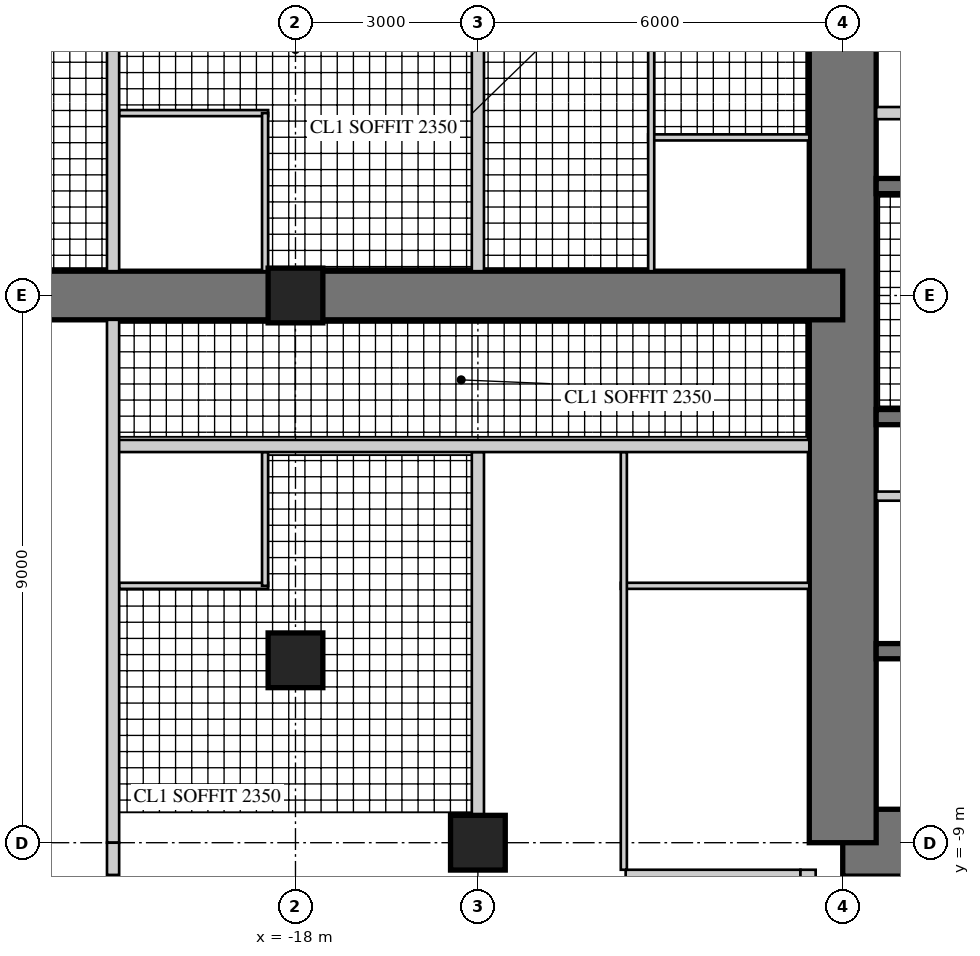
"""IFC4 building model, lengths in metres.
Left out: names, types, materials, properties, quantities, classifications, styles, units other than length and angle.
Written with IfcOpenShell. Run it as: python <this file> out.ifc"""

import sys

from ifc_helpers import new_model, si_unit, direction, frame, frame_2d, origin, origin_2d, place, context, subcontext, project, spatial, rectangle, hollow_rectangle, extrude, element, fill, save


model = new_model("IFC4")
c1 = context("Model", 3, precision=1e-05, world=origin(), true_north=direction((0.0, 1.0)))
c2 = subcontext(c1, "Body", "Model", "MODEL_VIEW")
j1 = project(units=[si_unit("LENGTHUNIT", "METRE"), si_unit("PLANEANGLEUNIT", "RADIAN")], contexts=[c1])
p1 = place(None, origin())
s1 = spatial("IfcSite", under=j1, at=p1, CompositionType="ELEMENT")
p2 = place(p1, origin())
s2 = spatial("IfcBuilding", under=s1, at=p2, CompositionType="ELEMENT")
p3 = place(p2, frame((0.0, 0.0, 179.7)))
s3 = spatial("IfcBuildingStorey", under=s2, at=p3, CompositionType="ELEMENT", Elevation=179.7)
p4 = place(p3, frame((-9.0, -9.0, 0.0), z_axis=(0.0, 0.0, 1.0), x_axis=(1.0, 0.0, 0.0)))
e1 = element("IfcWall", 1, at=p4, inside=s3, PredefinedType="SHEAR", context=c2, shape_type="SweptSolid", body=[
    extrude(rectangle(XDim=18.0, YDim=1.1, at=frame_2d((9.0, 0.0))), origin(), (0.0, 0.0, 1.0), 3.4),
])
p5 = place(p4, frame((9.8, 0.0, 0.0)))
e2 = element("IfcOpeningElement", 2, at=p5, cuts=e1, PredefinedType="OPENING", context=c2, shape_type="SweptSolid", body=[
    extrude(rectangle(XDim=1.0, YDim=2.4, at=frame_2d((0.5, 1.2))), frame((0.0, 0.56, 0.0), z_axis=(0.0, -1.0, 0.0), x_axis=(1.0, 0.0, 0.0)), (0.0, 0.0, 1.0), 1.12),
])
p6 = place(p3, frame((-9.0, 9.0, 0.0), z_axis=(0.0, 0.0, 1.0), x_axis=(0.0, -1.0, 0.0)))
e3 = element("IfcWall", 3, at=p6, inside=s3, PredefinedType="SHEAR", context=c2, shape_type="SweptSolid", body=[
    extrude(rectangle(XDim=18.0, YDim=1.1, at=frame_2d((9.0, 0.0))), origin(), (0.0, 0.0, 1.0), 3.4),
])
p7 = place(p6, frame((9.8, 0.0, 0.0)))
e4 = element("IfcOpeningElement", 4, at=p7, cuts=e3, PredefinedType="OPENING", context=c2, shape_type="SweptSolid", body=[
    extrude(rectangle(XDim=1.0, YDim=2.4, at=frame_2d((0.5, 1.2))), frame((0.0, 0.56, 0.0), z_axis=(0.0, -1.0, 0.0), x_axis=(1.0, 0.0, 0.0)), (0.0, 0.0, 1.0), 1.12),
])
p8 = place(p3, frame((-2.125, 1.8, 0.0), z_axis=(0.0, 0.0, 1.0), x_axis=(-1.0, 0.0, 0.0)))
e5 = element("IfcWall", 5, at=p8, inside=s3, PredefinedType="SHEAR", context=c2, shape_type="SweptSolid", body=[
    extrude(rectangle(XDim=6.325, YDim=0.25, at=frame_2d((3.163, 0.0))), origin(), (0.0, 0.0, 1.0), 3.4),
])
p9 = place(p3, frame((-5.725, 3.0, 0.0), z_axis=(0.0, 0.0, 1.0), x_axis=(-1.0, 0.0, 0.0)))
e6 = element("IfcWall", 6, at=p9, inside=s3, PredefinedType="PARTITIONING", context=c2, shape_type="SweptSolid", body=[
    extrude(rectangle(XDim=2.725, YDim=0.2, at=frame_2d((1.362, 0.0))), origin(), (0.0, 0.0, 1.0), 3.4),
])
p10 = place(p3, frame((-1.925, -2.0, 0.0), z_axis=(0.0, 0.0, 1.0), x_axis=(-1.0, 0.0, 0.0)))
e7 = element("IfcWall", 7, at=p10, inside=s3, PredefinedType="SHEAR", context=c2, shape_type="SweptSolid", body=[
    extrude(rectangle(XDim=6.525, YDim=0.25, at=frame_2d((3.262, 0.0))), origin(), (0.0, 0.0, 1.0), 3.4),
])
p11 = place(p3, frame((-1.925, -5.85, 0.0), z_axis=(0.0, 0.0, 1.0), x_axis=(-1.0, 0.0, 0.0)))
e8 = element("IfcWall", 8, at=p11, inside=s3, PredefinedType="SHEAR", context=c2, shape_type="SweptSolid", body=[
    extrude(rectangle(XDim=6.525, YDim=0.25, at=frame_2d((3.262, 0.0))), origin(), (0.0, 0.0, 1.0), 3.4),
])
p12 = place(p11, frame((0.471, 0.0, 0.0)))
e9 = element("IfcOpeningElement", 9, at=p12, cuts=e8, PredefinedType="OPENING", context=c2, shape_type="SweptSolid", body=[
    extrude(rectangle(XDim=1.1, YDim=2.2, at=frame_2d((0.55, 1.1))), frame((0.0, 0.135, 0.0), z_axis=(0.0, -1.0, 0.0), x_axis=(1.0, 0.0, 0.0)), (0.0, 0.0, 1.0), 0.27),
])
p13 = place(p11, frame((2.712, 0.0, 0.0)))
e10 = element("IfcOpeningElement", 10, at=p13, cuts=e8, PredefinedType="OPENING", context=c2, shape_type="SweptSolid", body=[
    extrude(rectangle(XDim=1.1, YDim=2.2, at=frame_2d((0.55, 1.1))), frame((0.0, 0.135, 0.0), z_axis=(0.0, -1.0, 0.0), x_axis=(1.0, 0.0, 0.0)), (0.0, 0.0, 1.0), 0.27),
])
p14 = place(p11, frame((4.954, 0.0, 0.0)))
e11 = element("IfcOpeningElement", 11, at=p14, cuts=e8, PredefinedType="OPENING", context=c2, shape_type="SweptSolid", body=[
    extrude(rectangle(XDim=1.1, YDim=2.2, at=frame_2d((0.55, 1.1))), frame((0.0, 0.135, 0.0), z_axis=(0.0, -1.0, 0.0), x_axis=(1.0, 0.0, 0.0)), (0.0, 0.0, 1.0), 0.27),
])
p15 = place(p3, frame((-1.925, -3.3, 0.0), z_axis=(0.0, 0.0, 1.0), x_axis=(-1.0, 0.0, 0.0)))
e12 = element("IfcWall", 12, at=p15, inside=s3, PredefinedType="PARTITIONING", context=c2, shape_type="SweptSolid", body=[
    extrude(rectangle(XDim=6.525, YDim=0.15, at=frame_2d((3.262, 0.0))), origin(), (0.0, 0.0, 1.0), 3.4),
])
p16 = place(p15, frame((0.075, 0.0, 0.0)))
e13 = element("IfcOpeningElement", 13, at=p16, cuts=e12, PredefinedType="OPENING", context=c2, shape_type="SweptSolid", body=[
    extrude(rectangle(XDim=0.8, YDim=2.1, at=frame_2d((0.4, 1.05))), frame((0.0, 0.085, 0.0), z_axis=(0.0, -1.0, 0.0), x_axis=(1.0, 0.0, 0.0)), (0.0, 0.0, 1.0), 0.17),
])
p17 = place(p15, frame((3.675, 0.0, 0.0)))
e14 = element("IfcOpeningElement", 14, at=p17, cuts=e12, PredefinedType="OPENING", context=c2, shape_type="SweptSolid", body=[
    extrude(rectangle(XDim=0.8, YDim=2.1, at=frame_2d((0.4, 1.05))), frame((0.0, 0.085, 0.0), z_axis=(0.0, -1.0, 0.0), x_axis=(1.0, 0.0, 0.0)), (0.0, 0.0, 1.0), 0.17),
])
p18 = place(p3, frame((-9.0, 0.0, 0.0), z_axis=(0.0, 0.0, 1.0), x_axis=(-1.0, 0.0, 0.0)))
e15 = element("IfcWall", 15, at=p18, inside=s3, PredefinedType="SHEAR", context=c2, shape_type="SweptSolid", body=[
    extrude(rectangle(XDim=18.0, YDim=0.8, at=frame_2d((9.0, 0.0))), origin(), (0.0, 0.0, 1.0), 3.4),
])
p19 = place(p18, frame((3.95, 0.0, 0.0)))
e16 = element("IfcOpeningElement", 16, at=p19, cuts=e15, PredefinedType="OPENING", context=c2, shape_type="SweptSolid", body=[
    extrude(rectangle(XDim=1.0, YDim=2.15, at=frame_2d((0.5, 1.075))), frame((0.0, 0.41, 0.0), z_axis=(0.0, -1.0, 0.0), x_axis=(1.0, 0.0, 0.0)), (0.0, 0.0, 1.0), 0.82),
])
p20 = place(p18, frame((6.6, 0.0, 0.0)))
e17 = element("IfcOpeningElement", 17, at=p20, cuts=e15, PredefinedType="OPENING", context=c2, shape_type="SweptSolid", body=[
    extrude(rectangle(XDim=1.0, YDim=2.15, at=frame_2d((0.5, 1.075))), frame((0.0, 0.41, 0.0), z_axis=(0.0, -1.0, 0.0), x_axis=(1.0, 0.0, 0.0)), (0.0, 0.0, 1.0), 0.82),
])
p21 = place(p18, frame((13.25, 0.0, 0.0)))
e18 = element("IfcOpeningElement", 18, at=p21, cuts=e15, PredefinedType="OPENING", context=c2, shape_type="SweptSolid", body=[
    extrude(rectangle(XDim=1.0, YDim=2.2, at=frame_2d((0.5, 1.1))), frame((0.0, 0.41, 0.0), z_axis=(0.0, -1.0, 0.0), x_axis=(1.0, 0.0, 0.0)), (0.0, 0.0, 1.0), 0.82),
])
for number, where, z_axis, x_axis in (
    (19, (-15.0, -9.0, 0.0), (0.0, 0.0, 1.0), (1.0, 0.0, 0.0)),
    (20, (-18.0, 0.0, 0.0), (0.0, 0.0, 1.0), (1.0, 0.0, 0.0)),
    (21, (-18.0, -6.0, 0.0), (0.0, 0.0, 1.0), (1.0, 0.0, 0.0)),
):
    element("IfcColumn", number, at=place(p3, frame(where, z_axis=z_axis, x_axis=x_axis)), inside=s3, PredefinedType="COLUMN", context=c2, shape_type="SweptSolid", body=[
        extrude(rectangle(XDim=0.9, YDim=0.9, at=origin_2d()), origin(), (0.0, 0.0, 1.0), 3.4),
    ])
p22 = place(p3, frame((-12.57, -9.57, 0.0), z_axis=(0.0, 0.0, 1.0), x_axis=(1.0, 0.0, 0.0)))
e22 = element("IfcWall", 22, at=p22, inside=s3, PredefinedType="SOLIDWALL", context=c2, shape_type="SweptSolid", body=[
    extrude(rectangle(XDim=2.875, YDim=0.25, at=frame_2d((1.438, 0.0))), origin(), (0.0, 0.0, 1.0), 3.22),
])
p23 = place(p22, frame((0.6, 0.0, 0.0)))
e23 = element("IfcOpeningElement", 23, at=p23, cuts=e22, PredefinedType="OPENING", context=c2, shape_type="SweptSolid", body=[
    extrude(rectangle(XDim=1.0, YDim=2.2, at=frame_2d((0.5, 1.1))), frame((0.0, 0.135, 0.0), z_axis=(0.0, -1.0, 0.0), x_axis=(1.0, 0.0, 0.0)), (0.0, 0.0, 1.0), 0.27),
])
p24 = place(p3, frame((-9.57, -9.445, 0.0), z_axis=(0.0, 0.0, 1.0), x_axis=(0.0, -1.0, 0.0)))
e24 = element("IfcWall", 24, at=p24, inside=s3, PredefinedType="SOLIDWALL", context=c2, shape_type="SweptSolid", body=[
    extrude(rectangle(XDim=3.125, YDim=0.25, at=frame_2d((1.562, 0.0))), origin(), (0.0, 0.0, 1.0), 3.22),
])
p25 = place(p24, frame((0.6, 0.0, 0.0)))
e25 = element("IfcOpeningElement", 25, at=p25, cuts=e24, PredefinedType="OPENING", context=c2, shape_type="SweptSolid", body=[
    extrude(rectangle(XDim=1.0, YDim=2.2, at=frame_2d((0.5, 1.1))), frame((0.0, 0.135, 0.0), z_axis=(0.0, -1.0, 0.0), x_axis=(1.0, 0.0, 0.0)), (0.0, 0.0, 1.0), 0.27),
])
p26 = place(p3, frame((-9.55, -4.775, 0.0), z_axis=(0.0, 0.0, 1.0), x_axis=(-1.0, 0.0, 0.0)))
e26 = element("IfcWall", 26, at=p26, inside=s3, PredefinedType="PARTITIONING", context=c2, shape_type="SweptSolid", body=[
    extrude(rectangle(XDim=3.1, YDim=0.1, at=frame_2d((1.55, 0.0))), origin(), (0.0, 0.0, 1.0), 3.22),
])
p27 = place(p3, frame((-12.6, -2.575, 0.0), z_axis=(0.0, 0.0, 1.0), x_axis=(0.0, -1.0, 0.0)))
e27 = element("IfcWall", 27, at=p27, inside=s3, PredefinedType="PARTITIONING", context=c2, shape_type="SweptSolid", body=[
    extrude(rectangle(XDim=6.87, YDim=0.1, at=frame_2d((3.435, 0.0))), origin(), (0.0, 0.0, 1.0), 3.22),
])
p28 = place(p27, frame((0.55, 0.0, 0.0)))
e28 = element("IfcOpeningElement", 28, at=p28, cuts=e27, PredefinedType="OPENING", context=c2, shape_type="SweptSolid", body=[
    extrude(rectangle(XDim=0.9, YDim=2.1, at=frame_2d((0.45, 1.05))), frame((0.0, 0.06, 0.0), z_axis=(0.0, -1.0, 0.0), x_axis=(1.0, 0.0, 0.0)), (0.0, 0.0, 1.0), 0.12),
])
p29 = place(p27, frame((2.65, 0.0, 0.0)))
e29 = element("IfcOpeningElement", 29, at=p29, cuts=e27, PredefinedType="OPENING", context=c2, shape_type="SweptSolid", body=[
    extrude(rectangle(XDim=0.9, YDim=2.1, at=frame_2d((0.45, 1.05))), frame((0.0, 0.06, 0.0), z_axis=(0.0, -1.0, 0.0), x_axis=(1.0, 0.0, 0.0)), (0.0, 0.0, 1.0), 0.12),
])
p30 = place(p3, frame((-9.55, 2.6, 0.0), z_axis=(0.0, 0.0, 1.0), x_axis=(-1.0, 0.0, 0.0)))
e30 = element("IfcWall", 30, at=p30, inside=s3, PredefinedType="PARTITIONING", context=c2, shape_type="SweptSolid", body=[
    extrude(rectangle(XDim=2.65, YDim=0.1, at=frame_2d((1.325, 0.0))), origin(), (0.0, 0.0, 1.0), 3.22),
])
p31 = place(p3, frame((-12.15, 9.445, 0.0), z_axis=(0.0, 0.0, 1.0), x_axis=(0.0, -1.0, 0.0)))
e31 = element("IfcWall", 31, at=p31, inside=s3, PredefinedType="PARTITIONING", context=c2, shape_type="SweptSolid", body=[
    extrude(rectangle(XDim=9.045, YDim=0.1, at=frame_2d((4.522, 0.0))), origin(), (0.0, 0.0, 1.0), 3.22),
])
p32 = place(p31, frame((5.495, 0.0, 0.0)))
e32 = element("IfcOpeningElement", 32, at=p32, cuts=e31, PredefinedType="OPENING", context=c2, shape_type="SweptSolid", body=[
    extrude(rectangle(XDim=0.9, YDim=2.1, at=frame_2d((0.45, 1.05))), frame((0.0, 0.06, 0.0), z_axis=(0.0, -1.0, 0.0), x_axis=(1.0, 0.0, 0.0)), (0.0, 0.0, 1.0), 0.12),
])
p33 = place(p31, frame((7.595, 0.0, 0.0)))
e33 = element("IfcOpeningElement", 33, at=p33, cuts=e31, PredefinedType="OPENING", context=c2, shape_type="SweptSolid", body=[
    extrude(rectangle(XDim=0.9, YDim=2.1, at=frame_2d((0.45, 1.05))), frame((0.0, 0.06, 0.0), z_axis=(0.0, -1.0, 0.0), x_axis=(1.0, 0.0, 0.0)), (0.0, 0.0, 1.0), 0.12),
])
p34 = place(p3, frame((-15.0, -2.575, 0.0), z_axis=(0.0, 0.0, 1.0), x_axis=(0.0, -1.0, 0.0)))
e34 = element("IfcWall", 34, at=p34, inside=s3, PredefinedType="SOLIDWALL", context=c2, shape_type="SweptSolid", body=[
    extrude(rectangle(XDim=5.975, YDim=0.2, at=frame_2d((2.988, 0.0))), origin(), (0.0, 0.0, 1.0), 2.47),
])
p35 = place(p3, frame((-15.0, 8.55, 0.0), z_axis=(0.0, 0.0, 1.0), x_axis=(0.0, -1.0, 0.0)))
e35 = element("IfcWall", 35, at=p35, inside=s3, PredefinedType="SOLIDWALL", context=c2, shape_type="SweptSolid", body=[
    extrude(rectangle(XDim=8.15, YDim=0.2, at=frame_2d((4.075, 0.0))), origin(), (0.0, 0.0, 1.0), 2.47),
])
p36 = place(p3, frame((-18.45, -4.775, 0.0), z_axis=(0.0, 0.0, 1.0), x_axis=(-1.0, 0.0, 0.0)))
e36 = element("IfcWall", 36, at=p36, inside=s3, PredefinedType="PARTITIONING", context=c2, shape_type="SweptSolid", body=[
    extrude(rectangle(XDim=2.45, YDim=0.1, at=frame_2d((1.225, 0.0))), origin(), (0.0, 0.0, 1.0), 3.22),
])
p37 = place(p3, frame((-18.5, -2.575, 0.0), z_axis=(0.0, 0.0, 1.0), x_axis=(0.0, -1.0, 0.0)))
e37 = element("IfcWall", 37, at=p37, inside=s3, PredefinedType="PARTITIONING", context=c2, shape_type="SweptSolid", body=[
    extrude(rectangle(XDim=2.2, YDim=0.1, at=frame_2d((1.1, 0.0))), origin(), (0.0, 0.0, 1.0), 3.22),
])
p38 = place(p37, frame((0.55, 0.0, 0.0)))
e38 = element("IfcOpeningElement", 38, at=p38, cuts=e37, PredefinedType="OPENING", context=c2, shape_type="SweptSolid", body=[
    extrude(rectangle(XDim=0.9, YDim=2.1, at=frame_2d((0.45, 1.05))), frame((0.0, 0.06, 0.0), z_axis=(0.0, -1.0, 0.0), x_axis=(1.0, 0.0, 0.0)), (0.0, 0.0, 1.0), 0.12),
])
p39 = place(p3, frame((-18.45, 3.0, 0.0), z_axis=(0.0, 0.0, 1.0), x_axis=(-1.0, 0.0, 0.0)))
e39 = element("IfcWall", 39, at=p39, inside=s3, PredefinedType="PARTITIONING", context=c2, shape_type="SweptSolid", body=[
    extrude(rectangle(XDim=2.45, YDim=0.1, at=frame_2d((1.225, 0.0))), origin(), (0.0, 0.0, 1.0), 3.22),
])
p40 = place(p3, frame((-18.5, 3.0, 0.0), z_axis=(0.0, 0.0, 1.0), x_axis=(0.0, -1.0, 0.0)))
e40 = element("IfcWall", 40, at=p40, inside=s3, PredefinedType="PARTITIONING", context=c2, shape_type="SweptSolid", body=[
    extrude(rectangle(XDim=2.6, YDim=0.1, at=frame_2d((1.3, 0.0))), origin(), (0.0, 0.0, 1.0), 3.22),
])
p41 = place(p40, frame((0.55, 0.0, 0.0)))
e41 = element("IfcOpeningElement", 41, at=p41, cuts=e40, PredefinedType="OPENING", context=c2, shape_type="SweptSolid", body=[
    extrude(rectangle(XDim=0.9, YDim=2.1, at=frame_2d((0.45, 1.05))), frame((0.0, 0.06, 0.0), z_axis=(0.0, -1.0, 0.0), x_axis=(1.0, 0.0, 0.0)), (0.0, 0.0, 1.0), 0.12),
])
p42 = place(p3, frame((-9.55, -2.475, 0.0), z_axis=(0.0, 0.0, 1.0), x_axis=(-1.0, 0.0, 0.0)))
e42 = element("IfcWall", 42, at=p42, inside=s3, PredefinedType="SOLIDWALL", context=c2, shape_type="SweptSolid", body=[
    extrude(rectangle(XDim=11.45, YDim=0.2, at=frame_2d((5.725, 0.0))), origin(), (0.0, 0.0, 1.0), 3.22),
])
p43 = place(p42, frame((3.6, 0.0, 0.0)))
e43 = element("IfcOpeningElement", 43, at=p43, cuts=e42, PredefinedType="OPENING", context=c2, shape_type="SweptSolid", body=[
    extrude(rectangle(XDim=1.0, YDim=2.15, at=frame_2d((0.5, 1.075))), frame((0.0, 0.11, 0.0), z_axis=(0.0, -1.0, 0.0), x_axis=(1.0, 0.0, 0.0)), (0.0, 0.0, 1.0), 0.22),
])
p44 = place(p42, frame((6.05, 0.0, 0.0)))
e44 = element("IfcOpeningElement", 44, at=p44, cuts=e42, PredefinedType="OPENING", context=c2, shape_type="SweptSolid", body=[
    extrude(rectangle(XDim=1.0, YDim=2.15, at=frame_2d((0.5, 1.075))), frame((0.0, 0.11, 0.0), z_axis=(0.0, -1.0, 0.0), x_axis=(1.0, 0.0, 0.0)), (0.0, 0.0, 1.0), 0.22),
])
p45 = place(p3, frame((-21.0, 9.0, 0.0), z_axis=(0.0, 0.0, 1.0), x_axis=(0.0, -1.0, 0.0)))
e45 = element("IfcWall", 45, at=p45, inside=s3, PredefinedType="SOLIDWALL", context=c2, shape_type="SweptSolid", body=[
    extrude(rectangle(XDim=8.6, YDim=0.2, at=frame_2d((4.3, 0.0))), origin(), (0.0, 0.0, 1.0), 2.62),
])
p46 = place(p3, frame((-21.0, -0.4, 0.0), z_axis=(0.0, 0.0, 1.0), x_axis=(0.0, -1.0, 0.0)))
e46 = element("IfcWall", 46, at=p46, inside=s3, PredefinedType="SOLIDWALL", context=c2, shape_type="SweptSolid", body=[
    extrude(rectangle(XDim=8.6, YDim=0.2, at=frame_2d((4.3, 0.0))), origin(), (0.0, 0.0, 1.0), 2.62),
])
p47 = place(p46, frame((0.4, 0.0, 0.0)))
e47 = element("IfcOpeningElement", 47, at=p47, cuts=e46, PredefinedType="OPENING", context=c2, shape_type="SweptSolid", body=[
    extrude(rectangle(XDim=1.0, YDim=2.2, at=frame_2d((0.5, 1.1))), frame((0.0, 0.11, 0.0), z_axis=(0.0, -1.0, 0.0), x_axis=(1.0, 0.0, 0.0)), (0.0, 0.0, 1.0), 0.22),
])
p48 = place(p3, frame((-21.0, -9.0, 0.0), z_axis=(0.0, 0.0, 1.0), x_axis=(0.0, -1.0, 0.0)))
e48 = element("IfcWall", 48, at=p48, inside=s3, PredefinedType="SOLIDWALL", context=c2, shape_type="SweptSolid", body=[
    extrude(rectangle(XDim=0.53, YDim=0.2, at=frame_2d((0.265, 0.0))), origin(), (0.0, 0.0, 1.0), 3.22),
])
p49 = place(p23, origin())
e49 = element("IfcDoor", 49, at=p49, inside=s3, OperationType="SINGLE_SWING_LEFT", PredefinedType="DOOR", context=c2, shape_type="SweptSolid", body=[
    extrude(hollow_rectangle(XDim=1.0, YDim=2.2, WallThickness=0.06, at=frame_2d((0.5, 1.1))), frame((0.0, 0.025, 0.0), z_axis=(0.0, -1.0, 0.0), x_axis=(1.0, 0.0, 0.0)), (0.0, 0.0, 1.0), 0.05),
    extrude(rectangle(XDim=0.879, YDim=2.079, at=frame_2d((0.5, 1.1))), frame((0.0, 0.025, 0.0), z_axis=(0.0, -1.0, 0.0), x_axis=(1.0, 0.0, 0.0)), (0.0, 0.0, 1.0), 0.05),
])
fill(e23, e49)
p50 = place(p28, origin())
e50 = element("IfcDoor", 50, at=p50, inside=s3, OperationType="SINGLE_SWING_LEFT", PredefinedType="DOOR", context=c2, shape_type="SweptSolid", body=[
    extrude(rectangle(XDim=0.9, YDim=2.1, at=frame_2d((0.45, 1.05))), frame((0.0, 0.025, 0.0), z_axis=(0.0, -1.0, 0.0), x_axis=(1.0, 0.0, 0.0)), (0.0, 0.0, 1.0), 0.05),
])
fill(e28, e50)
p51 = place(p29, origin())
e51 = element("IfcDoor", 51, at=p51, inside=s3, OperationType="SINGLE_SWING_LEFT", PredefinedType="DOOR", context=c2, shape_type="SweptSolid", body=[
    extrude(rectangle(XDim=0.9, YDim=2.1, at=frame_2d((0.45, 1.05))), frame((0.0, 0.025, 0.0), z_axis=(0.0, -1.0, 0.0), x_axis=(1.0, 0.0, 0.0)), (0.0, 0.0, 1.0), 0.05),
])
fill(e29, e51)
p52 = place(p32, origin())
e52 = element("IfcDoor", 52, at=p52, inside=s3, OperationType="SINGLE_SWING_RIGHT", PredefinedType="DOOR", context=c2, shape_type="SweptSolid", body=[
    extrude(rectangle(XDim=0.9, YDim=2.1, at=frame_2d((0.45, 1.05))), frame((0.0, 0.025, 0.0), z_axis=(0.0, -1.0, 0.0), x_axis=(1.0, 0.0, 0.0)), (0.0, 0.0, 1.0), 0.05),
])
fill(e32, e52)
p53 = place(p33, origin())
e53 = element("IfcDoor", 53, at=p53, inside=s3, OperationType="SINGLE_SWING_RIGHT", PredefinedType="DOOR", context=c2, shape_type="SweptSolid", body=[
    extrude(rectangle(XDim=0.9, YDim=2.1, at=frame_2d((0.45, 1.05))), frame((0.0, 0.025, 0.0), z_axis=(0.0, -1.0, 0.0), x_axis=(1.0, 0.0, 0.0)), (0.0, 0.0, 1.0), 0.05),
])
fill(e33, e53)
p54 = place(p38, frame((0.9, 0.0, 0.0), z_axis=(0.0, 0.0, 1.0), x_axis=(-1.0, 0.0, 0.0)))
e54 = element("IfcDoor", 54, at=p54, inside=s3, OperationType="SINGLE_SWING_RIGHT", PredefinedType="DOOR", context=c2, shape_type="SweptSolid", body=[
    extrude(rectangle(XDim=0.9, YDim=2.1, at=frame_2d((0.45, 1.05))), frame((0.0, 0.025, 0.0), z_axis=(0.0, -1.0, 0.0), x_axis=(1.0, 0.0, 0.0)), (0.0, 0.0, 1.0), 0.05),
])
fill(e38, e54)
p55 = place(p41, frame((0.9, 0.0, 0.0), z_axis=(0.0, 0.0, 1.0), x_axis=(-1.0, 0.0, 0.0)))
e55 = element("IfcDoor", 55, at=p55, inside=s3, OperationType="SINGLE_SWING_RIGHT", PredefinedType="DOOR", context=c2, shape_type="SweptSolid", body=[
    extrude(rectangle(XDim=0.9, YDim=2.1, at=frame_2d((0.45, 1.05))), frame((0.0, 0.025, 0.0), z_axis=(0.0, -1.0, 0.0), x_axis=(1.0, 0.0, 0.0)), (0.0, 0.0, 1.0), 0.05),
])
fill(e41, e55)
p56 = place(p43, origin())
e56 = element("IfcDoor", 56, at=p56, inside=s3, OperationType="SINGLE_SWING_LEFT", PredefinedType="DOOR", context=c2, shape_type="SweptSolid", body=[
    extrude(rectangle(XDim=1.0, YDim=2.15, at=frame_2d((0.5, 1.075))), frame((0.0, 0.025, 0.0), z_axis=(0.0, -1.0, 0.0), x_axis=(1.0, 0.0, 0.0)), (0.0, 0.0, 1.0), 0.05),
])
fill(e43, e56)
p57 = place(p44, origin())
e57 = element("IfcDoor", 57, at=p57, inside=s3, OperationType="SINGLE_SWING_LEFT", PredefinedType="DOOR", context=c2, shape_type="SweptSolid", body=[
    extrude(rectangle(XDim=1.0, YDim=2.15, at=frame_2d((0.5, 1.075))), frame((0.0, 0.025, 0.0), z_axis=(0.0, -1.0, 0.0), x_axis=(1.0, 0.0, 0.0)), (0.0, 0.0, 1.0), 0.05),
])
fill(e44, e57)
p58 = place(p47, frame((1.0, 0.0, 0.0), z_axis=(0.0, 0.0, 1.0), x_axis=(-1.0, 0.0, 0.0)))
e58 = element("IfcDoor", 58, at=p58, inside=s3, OperationType="SINGLE_SWING_RIGHT", PredefinedType="DOOR", context=c2, shape_type="SweptSolid", body=[
    extrude(rectangle(XDim=1.0, YDim=2.2, at=frame_2d((0.5, 1.1))), frame((0.0, 0.025, 0.0), z_axis=(0.0, -1.0, 0.0), x_axis=(1.0, 0.0, 0.0)), (0.0, 0.0, 1.0), 0.05),
])
fill(e47, e58)
p59 = place(p19, frame((1.0, 0.0, 0.0), z_axis=(0.0, 0.0, 1.0), x_axis=(-1.0, 0.0, 0.0)))
e59 = element("IfcDoor", 59, at=p59, inside=s3, OperationType="SINGLE_SWING_RIGHT", PredefinedType="DOOR", context=c2, shape_type="SweptSolid", body=[
    extrude(rectangle(XDim=1.0, YDim=2.15, at=frame_2d((0.5, 1.075))), frame((0.0, 0.025, 0.0), z_axis=(0.0, -1.0, 0.0), x_axis=(1.0, 0.0, 0.0)), (0.0, 0.0, 1.0), 0.05),
])
fill(e16, e59)
p60 = place(p20, frame((1.0, 0.0, 0.0), z_axis=(0.0, 0.0, 1.0), x_axis=(-1.0, 0.0, 0.0)))
e60 = element("IfcDoor", 60, at=p60, inside=s3, OperationType="SINGLE_SWING_RIGHT", PredefinedType="DOOR", context=c2, shape_type="SweptSolid", body=[
    extrude(rectangle(XDim=1.0, YDim=2.15, at=frame_2d((0.5, 1.075))), frame((0.0, 0.025, 0.0), z_axis=(0.0, -1.0, 0.0), x_axis=(1.0, 0.0, 0.0)), (0.0, 0.0, 1.0), 0.05),
])
fill(e17, e60)
p61 = place(p7, origin())
e61 = element("IfcDoor", 61, at=p61, inside=s3, OperationType="SINGLE_SWING_RIGHT", PredefinedType="DOOR", context=c2, shape_type="SweptSolid", body=[
    extrude(rectangle(XDim=1.0, YDim=2.4, at=frame_2d((0.5, 1.2))), frame((0.0, 0.055, 0.0), z_axis=(0.0, -1.0, 0.0), x_axis=(1.0, 0.0, 0.0)), (0.0, 0.0, 1.0), 0.05),
])
fill(e4, e61)
save(model, sys.argv[1])
